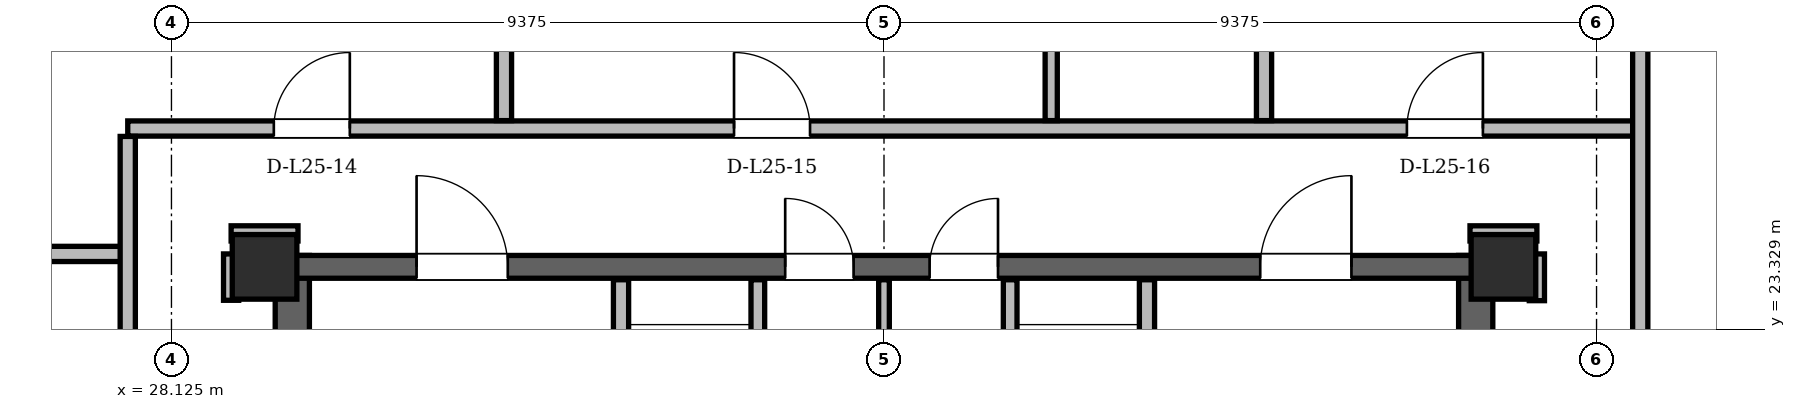
"""IFC4 building model, lengths in metres.
Left out: names, types, materials, properties, quantities, classifications, styles, units other than length and angle.
Written with IfcOpenShell. Run it as: python <this file> out.ifc"""

import sys

from ifc_helpers import new_model, si_unit, direction, frame, frame_2d, origin, origin_2d, place, context, subcontext, project, spatial, rectangle, hollow_rectangle, extrude, element, fill, save


model = new_model("IFC4")
c1 = context("Model", 3, precision=1e-05, world=origin(), true_north=direction((0.0, 1.0)))
c2 = subcontext(c1, "Body", "Model", "MODEL_VIEW")
j1 = project(units=[si_unit("LENGTHUNIT", "METRE"), si_unit("PLANEANGLEUNIT", "RADIAN")], contexts=[c1])
p1 = place(None, origin())
s1 = spatial("IfcSite", under=j1, at=p1, CompositionType="ELEMENT")
p2 = place(p1, origin())
s2 = spatial("IfcBuilding", under=s1, at=p2, CompositionType="ELEMENT")
p3 = place(p2, frame((0.0, 0.0, 96.9)))
s3 = spatial("IfcBuildingStorey", under=s2, at=p3, CompositionType="ELEMENT", Elevation=96.9)
for number, where, z_axis, x_axis in (
    (1, (45.65, 24.15, 0.0), (0.0, 0.0, 1.0), (1.0, 0.0, 0.0)),
    (2, (29.35, 24.15, 0.0), (0.0, 0.0, 1.0), (1.0, 0.0, 0.0)),
):
    element("IfcColumn", number, at=place(p3, frame(where, z_axis=z_axis, x_axis=x_axis)), inside=s3, PredefinedType="COLUMN", context=c2, shape_type="SweptSolid", body=[
        extrude(hollow_rectangle(XDim=0.85, YDim=0.85, WallThickness=0.07, at=origin_2d()), origin(), (0.0, 0.0, 1.0), 3.6),
    ])
for number, where, z_axis, x_axis in (
    (3, (29.715, 11.0, 0.0), (0.0, 0.0, 1.0), (0.0, 1.0, 0.0)),
    (4, (45.285, 11.0, 0.0), (0.0, 0.0, 1.0), (0.0, 1.0, 0.0)),
):
    element("IfcWall", number, at=place(p3, frame(where, z_axis=z_axis, x_axis=x_axis)), inside=s3, PredefinedType="SHEAR", context=c2, shape_type="SweptSolid", body=[
        extrude(rectangle(XDim=13.3, YDim=0.45, at=frame_2d((6.65, 0.0))), origin(), (0.0, 0.0, 1.0), 3.36),
    ])
p4 = place(p3, frame((29.65, 24.15, 0.0), z_axis=(0.0, 0.0, 1.0), x_axis=(1.0, 0.0, 0.0)))
e5 = element("IfcWall", 5, at=p4, inside=s3, PredefinedType="SHEAR", context=c2, shape_type="SweptSolid", body=[
    extrude(rectangle(XDim=15.7, YDim=0.3, at=frame_2d((7.85, 0.0))), origin(), (0.0, 0.0, 1.0), 3.36),
])
p5 = place(p4, frame((1.7, 0.0, 0.0)))
e6 = element("IfcOpeningElement", 6, at=p5, cuts=e5, PredefinedType="OPENING", context=c2, shape_type="SweptSolid", body=[
    extrude(rectangle(XDim=1.2, YDim=2.2, at=frame_2d((0.6, 1.1))), frame((0.0, 0.15, 0.0), z_axis=(0.0, -1.0, 0.0), x_axis=(1.0, 0.0, 0.0)), (0.0, 0.0, 1.0), 0.3),
])
p6 = place(p4, frame((12.8, 0.0, 0.0)))
e7 = element("IfcOpeningElement", 7, at=p6, cuts=e5, PredefinedType="OPENING", context=c2, shape_type="SweptSolid", body=[
    extrude(rectangle(XDim=1.2, YDim=2.2, at=frame_2d((0.6, 1.1))), frame((0.0, 0.15, 0.0), z_axis=(0.0, -1.0, 0.0), x_axis=(1.0, 0.0, 0.0)), (0.0, 0.0, 1.0), 0.3),
])
p7 = place(p4, frame((6.55, 0.0, 0.0)))
e8 = element("IfcOpeningElement", 8, at=p7, cuts=e5, PredefinedType="OPENING", context=c2, shape_type="SweptSolid", body=[
    extrude(rectangle(XDim=0.9, YDim=2.05, at=frame_2d((0.45, 1.025))), frame((0.0, 0.15, 0.0), z_axis=(0.0, -1.0, 0.0), x_axis=(1.0, 0.0, 0.0)), (0.0, 0.0, 1.0), 0.3),
])
p8 = place(p4, frame((8.45, 0.0, 0.0)))
e9 = element("IfcOpeningElement", 9, at=p8, cuts=e5, PredefinedType="OPENING", context=c2, shape_type="SweptSolid", body=[
    extrude(rectangle(XDim=0.9, YDim=2.05, at=frame_2d((0.45, 1.025))), frame((0.0, 0.15, 0.0), z_axis=(0.0, -1.0, 0.0), x_axis=(1.0, 0.0, 0.0)), (0.0, 0.0, 1.0), 0.3),
])
p9 = place(p3, frame((60.746, 13.639, 0.0), z_axis=(0.0, 0.0, 1.0), x_axis=(-0.499995749028, 0.86602785807, 0.0)))
e10 = element("IfcWall", 10, at=p9, inside=s3, PredefinedType="SOLIDWALL", context=c2, shape_type="SweptSolid", body=[
    extrude(rectangle(XDim=34.437, YDim=0.34, at=frame_2d((17.218, 0.0))), origin(), (0.0, 0.0, 1.0), 2.578),
])
p10 = place(p9, frame((3.01, 0.0, 0.0)))
e11 = element("IfcOpeningElement", 11, at=p10, cuts=e10, PredefinedType="OPENING", context=c2, shape_type="SweptSolid", body=[
    extrude(rectangle(XDim=1.5, YDim=2.2, at=frame_2d((0.75, 1.1))), frame((0.0, 0.17, 0.0), z_axis=(0.0, -1.0, 0.0), x_axis=(1.0, 0.0, 0.0)), (0.0, 0.0, 1.0), 0.34),
])
p11 = place(p9, frame((26.162, 0.0, 0.0)))
e12 = element("IfcOpeningElement", 12, at=p11, cuts=e10, PredefinedType="OPENING", context=c2, shape_type="SweptSolid", body=[
    extrude(rectangle(XDim=1.5, YDim=2.2, at=frame_2d((0.75, 1.1))), frame((0.0, 0.17, 0.0), z_axis=(0.0, -1.0, 0.0), x_axis=(1.0, 0.0, 0.0)), (0.0, 0.0, 1.0), 0.34),
])
p12 = place(p9, frame((0.966, 0.0, 0.85)))
e13 = element("IfcOpeningElement", 13, at=p12, cuts=e10, PredefinedType="OPENING", context=c2, shape_type="SweptSolid", body=[
    extrude(rectangle(XDim=1.2, YDim=1.48, at=frame_2d((0.6, 0.74))), frame((0.0, 0.17, 0.0), z_axis=(0.0, -1.0, 0.0), x_axis=(1.0, 0.0, 0.0)), (0.0, 0.0, 1.0), 0.34),
])
p13 = place(p9, frame((16.893, 0.0, 0.85)))
e14 = element("IfcOpeningElement", 14, at=p13, cuts=e10, PredefinedType="OPENING", context=c2, shape_type="SweptSolid", body=[
    extrude(rectangle(XDim=1.6, YDim=1.618, at=frame_2d((0.8, 0.809))), frame((0.0, 0.17, 0.0), z_axis=(0.0, -1.0, 0.0), x_axis=(1.0, 0.0, 0.0)), (0.0, 0.0, 1.0), 0.34),
])
p14 = place(p9, frame((21.524, 0.0, 0.85)))
e15 = element("IfcOpeningElement", 15, at=p14, cuts=e10, PredefinedType="OPENING", context=c2, shape_type="SweptSolid", body=[
    extrude(rectangle(XDim=1.2, YDim=1.48, at=frame_2d((0.6, 0.74))), frame((0.0, 0.17, 0.0), z_axis=(0.0, -1.0, 0.0), x_axis=(1.0, 0.0, 0.0)), (0.0, 0.0, 1.0), 0.34),
])
p15 = place(p9, frame((13.377, 0.0, 0.85)))
e16 = element("IfcOpeningElement", 16, at=p15, cuts=e10, PredefinedType="OPENING", context=c2, shape_type="SweptSolid", body=[
    extrude(rectangle(XDim=1.2, YDim=1.48, at=frame_2d((0.6, 0.74))), frame((0.0, 0.17, 0.0), z_axis=(0.0, -1.0, 0.0), x_axis=(1.0, 0.0, 0.0)), (0.0, 0.0, 1.0), 0.34),
])
p16 = place(p9, frame((30.824, 0.0, 0.85)))
e17 = element("IfcOpeningElement", 17, at=p16, cuts=e10, PredefinedType="OPENING", context=c2, shape_type="SweptSolid", body=[
    extrude(rectangle(XDim=2.6, YDim=1.618, at=frame_2d((1.3, 0.809))), frame((0.0, 0.17, 0.0), z_axis=(0.0, -1.0, 0.0), x_axis=(1.0, 0.0, 0.0)), (0.0, 0.0, 1.0), 0.34),
])
p17 = place(p3, frame((31.472, 43.462, 0.0), z_axis=(0.0, 0.0, 1.0), x_axis=(-0.499995749028, -0.86602785807, 0.0)))
e18 = element("IfcWall", 18, at=p17, inside=s3, PredefinedType="SOLIDWALL", context=c2, shape_type="SweptSolid", body=[
    extrude(rectangle(XDim=34.437, YDim=0.34, at=frame_2d((17.218, 0.0))), origin(), (0.0, 0.0, 1.0), 2.578),
])
p18 = place(p17, frame((6.469, 0.0, 0.0)))
e19 = element("IfcOpeningElement", 19, at=p18, cuts=e18, PredefinedType="OPENING", context=c2, shape_type="SweptSolid", body=[
    extrude(rectangle(XDim=1.3, YDim=2.2, at=frame_2d((0.65, 1.1))), frame((0.0, 0.17, 0.0), z_axis=(0.0, -1.0, 0.0), x_axis=(1.0, 0.0, 0.0)), (0.0, 0.0, 1.0), 0.34),
])
p19 = place(p17, frame((24.902, 0.0, 0.0)))
e20 = element("IfcOpeningElement", 20, at=p19, cuts=e18, PredefinedType="OPENING", context=c2, shape_type="SweptSolid", body=[
    extrude(rectangle(XDim=1.5, YDim=2.2, at=frame_2d((0.75, 1.1))), frame((0.0, 0.17, 0.0), z_axis=(0.0, -1.0, 0.0), x_axis=(1.0, 0.0, 0.0)), (0.0, 0.0, 1.0), 0.34),
])
p20 = place(p17, frame((30.75, 0.0, 0.85)))
e21 = element("IfcOpeningElement", 21, at=p20, cuts=e18, PredefinedType="OPENING", context=c2, shape_type="SweptSolid", body=[
    extrude(rectangle(XDim=1.4, YDim=1.6, at=frame_2d((0.7, 0.8))), frame((0.0, 0.17, 0.0), z_axis=(0.0, -1.0, 0.0), x_axis=(1.0, 0.0, 0.0)), (0.0, 0.0, 1.0), 0.34),
])
p21 = place(p17, frame((11.337, 0.0, 0.85)))
e22 = element("IfcOpeningElement", 22, at=p21, cuts=e18, PredefinedType="OPENING", context=c2, shape_type="SweptSolid", body=[
    extrude(rectangle(XDim=2.8, YDim=1.618, at=frame_2d((1.4, 0.809))), frame((0.0, 0.17, 0.0), z_axis=(0.0, -1.0, 0.0), x_axis=(1.0, 0.0, 0.0)), (0.0, 0.0, 1.0), 0.34),
])
p22 = place(p17, frame((18.111, 0.0, 0.85)))
e23 = element("IfcOpeningElement", 23, at=p22, cuts=e18, PredefinedType="OPENING", context=c2, shape_type="SweptSolid", body=[
    extrude(rectangle(XDim=2.2, YDim=1.618, at=frame_2d((1.1, 0.809))), frame((0.0, 0.17, 0.0), z_axis=(0.0, -1.0, 0.0), x_axis=(1.0, 0.0, 0.0)), (0.0, 0.0, 1.0), 0.34),
])
p23 = place(p17, frame((3.044, 0.0, 0.85)))
e24 = element("IfcOpeningElement", 24, at=p23, cuts=e18, PredefinedType="OPENING", context=c2, shape_type="SweptSolid", body=[
    extrude(rectangle(XDim=1.2, YDim=1.48, at=frame_2d((0.6, 0.74))), frame((0.0, 0.17, 0.0), z_axis=(0.0, -1.0, 0.0), x_axis=(1.0, 0.0, 0.0)), (0.0, 0.0, 1.0), 0.34),
])
p24 = place(p3, frame((34.04, 19.48, 0.0), z_axis=(0.0, 0.0, 1.0), x_axis=(0.0, 1.0, 0.0)))
e25 = element("IfcWall", 25, at=p24, inside=s3, PredefinedType="PARTITIONING", context=c2, shape_type="SweptSolid", body=[
    extrude(rectangle(XDim=4.5, YDim=0.2, at=frame_2d((2.25, 0.0))), origin(), (0.0, 0.0, 1.0), 2.4),
])
p25 = place(p24, frame((2.12, 0.0, 0.0)))
e26 = element("IfcOpeningElement", 26, at=p25, cuts=e25, PredefinedType="OPENING", context=c2, shape_type="SweptSolid", body=[
    extrude(rectangle(XDim=1.1, YDim=2.2, at=frame_2d((0.55, 1.1))), frame((0.0, 0.1, 0.0), z_axis=(0.0, -1.0, 0.0), x_axis=(1.0, 0.0, 0.0)), (0.0, 0.0, 1.0), 0.2),
])
p26 = place(p3, frame((35.84, 20.96, 0.0), z_axis=(0.0, 0.0, 1.0), x_axis=(0.0, 1.0, 0.0)))
e27 = element("IfcWall", 27, at=p26, inside=s3, PredefinedType="PARTITIONING", context=c2, shape_type="SweptSolid", body=[
    extrude(rectangle(XDim=3.02, YDim=0.18, at=frame_2d((1.51, 0.0))), origin(), (0.0, 0.0, 1.0), 2.4),
])
p27 = place(p3, frame((40.96, 19.48, 0.0), z_axis=(0.0, 0.0, 1.0), x_axis=(0.0, 1.0, 0.0)))
e28 = element("IfcWall", 28, at=p27, inside=s3, PredefinedType="PARTITIONING", context=c2, shape_type="SweptSolid", body=[
    extrude(rectangle(XDim=4.5, YDim=0.2, at=frame_2d((2.25, 0.0))), origin(), (0.0, 0.0, 1.0), 2.4),
])
p28 = place(p27, frame((2.12, 0.0, 0.0)))
e29 = element("IfcOpeningElement", 29, at=p28, cuts=e28, PredefinedType="OPENING", context=c2, shape_type="SweptSolid", body=[
    extrude(rectangle(XDim=1.1, YDim=2.2, at=frame_2d((0.55, 1.1))), frame((0.0, 0.1, 0.0), z_axis=(0.0, -1.0, 0.0), x_axis=(1.0, 0.0, 0.0)), (0.0, 0.0, 1.0), 0.2),
])
p29 = place(p3, frame((39.16, 20.96, 0.0), z_axis=(0.0, 0.0, 1.0), x_axis=(0.0, 1.0, 0.0)))
e30 = element("IfcWall", 30, at=p29, inside=s3, PredefinedType="PARTITIONING", context=c2, shape_type="SweptSolid", body=[
    extrude(rectangle(XDim=3.02, YDim=0.18, at=frame_2d((1.51, 0.0))), origin(), (0.0, 0.0, 1.0), 2.4),
])
p30 = place(p3, frame((37.5, 21.06, 0.0), z_axis=(0.0, 0.0, 1.0), x_axis=(0.0, 1.0, 0.0)))
e31 = element("IfcWall", 31, at=p30, inside=s3, PredefinedType="PARTITIONING", context=c2, shape_type="SweptSolid", body=[
    extrude(rectangle(XDim=2.92, YDim=0.14, at=frame_2d((1.46, 0.0))), origin(), (0.0, 0.0, 1.0), 2.4),
])
p31 = place(p3, frame((20.621, 24.32, 0.0), z_axis=(0.0, 0.0, 1.0), x_axis=(1.0, 0.0, 0.0)))
e32 = element("IfcWall", 32, at=p31, inside=s3, PredefinedType="PARTITIONING", context=c2, shape_type="SweptSolid", body=[
    extrude(rectangle(XDim=6.929, YDim=0.2, at=frame_2d((3.464, 0.0))), origin(), (0.0, 0.0, 1.0), 3.36),
])
for number, where, z_axis, x_axis in (
    (33, (28.91, 24.59, 0.0), (0.0, 0.0, 1.0), (1.0, 0.0, 0.0)),
    (34, (45.21, 24.59, 0.0), (0.0, 0.0, 1.0), (1.0, 0.0, 0.0)),
):
    element("IfcWall", number, at=place(p3, frame(where, z_axis=z_axis, x_axis=x_axis)), inside=s3, PredefinedType="PARTITIONING", context=c2, shape_type="SweptSolid", body=[
        extrude(rectangle(XDim=0.88, YDim=0.2, at=frame_2d((0.44, 0.0))), origin(), (0.0, 0.0, 1.0), 2.814),
    ])
p32 = place(p3, frame((27.55, 25.97, 0.0), z_axis=(0.0, 0.0, 1.0), x_axis=(1.0, 0.0, 0.0)))
e35 = element("IfcWall", 35, at=p32, inside=s3, PredefinedType="PARTITIONING", context=c2, shape_type="SweptSolid", body=[
    extrude(rectangle(XDim=19.9, YDim=0.2, at=frame_2d((9.95, 0.0))), origin(), (0.0, 0.0, 1.0), 2.814),
])
p33 = place(p32, frame((1.922, 0.0, 0.0)))
e36 = element("IfcOpeningElement", 36, at=p33, cuts=e35, PredefinedType="OPENING", context=c2, shape_type="SweptSolid", body=[
    extrude(rectangle(XDim=1.0, YDim=2.18, at=frame_2d((0.5, 1.09))), frame((0.0, 0.1, 0.0), z_axis=(0.0, -1.0, 0.0), x_axis=(1.0, 0.0, 0.0)), (0.0, 0.0, 1.0), 0.2),
])
p34 = place(p32, frame((7.977, 0.0, 0.0)))
e37 = element("IfcOpeningElement", 37, at=p34, cuts=e35, PredefinedType="OPENING", context=c2, shape_type="SweptSolid", body=[
    extrude(rectangle(XDim=1.0, YDim=2.18, at=frame_2d((0.5, 1.09))), frame((0.0, 0.1, 0.0), z_axis=(0.0, -1.0, 0.0), x_axis=(1.0, 0.0, 0.0)), (0.0, 0.0, 1.0), 0.2),
])
p35 = place(p32, frame((16.83, 0.0, 0.0)))
e38 = element("IfcOpeningElement", 38, at=p35, cuts=e35, PredefinedType="OPENING", context=c2, shape_type="SweptSolid", body=[
    extrude(rectangle(XDim=1.0, YDim=2.18, at=frame_2d((0.5, 1.09))), frame((0.0, 0.1, 0.0), z_axis=(0.0, -1.0, 0.0), x_axis=(1.0, 0.0, 0.0)), (0.0, 0.0, 1.0), 0.2),
])
p36 = place(p3, frame((27.55, 11.054, 0.0), z_axis=(0.0, 0.0, 1.0), x_axis=(0.0, 1.0, 0.0)))
e39 = element("IfcWall", 39, at=p36, inside=s3, PredefinedType="PARTITIONING", context=c2, shape_type="SweptSolid", body=[
    extrude(rectangle(XDim=14.812, YDim=0.2, at=frame_2d((7.406, 0.0))), origin(), (0.0, 0.0, 1.0), 2.814),
])
p37 = place(p36, frame((3.825, 0.0, 0.0)))
e40 = element("IfcOpeningElement", 40, at=p37, cuts=e39, PredefinedType="OPENING", context=c2, shape_type="SweptSolid", body=[
    extrude(rectangle(XDim=1.0, YDim=2.18, at=frame_2d((0.5, 1.09))), frame((0.0, 0.1, 0.0), z_axis=(0.0, -1.0, 0.0), x_axis=(1.0, 0.0, 0.0)), (0.0, 0.0, 1.0), 0.2),
])
p38 = place(p36, frame((7.788, 0.0, 0.0)))
e41 = element("IfcOpeningElement", 41, at=p38, cuts=e39, PredefinedType="OPENING", context=c2, shape_type="SweptSolid", body=[
    extrude(rectangle(XDim=1.0, YDim=2.18, at=frame_2d((0.5, 1.09))), frame((0.0, 0.1, 0.0), z_axis=(0.0, -1.0, 0.0), x_axis=(1.0, 0.0, 0.0)), (0.0, 0.0, 1.0), 0.2),
])
p39 = place(p3, frame((28.91, 23.71, 0.0), z_axis=(0.0, 0.0, 1.0), x_axis=(0.0, 1.0, 0.0)))
e42 = element("IfcWall", 42, at=p39, inside=s3, PredefinedType="PARTITIONING", context=c2, shape_type="SweptSolid", body=[
    extrude(rectangle(XDim=0.61, YDim=0.2, at=frame_2d((0.305, 0.0))), origin(), (0.0, 0.0, 1.0), 3.36),
])
p40 = place(p3, frame((32.5, 26.074, 0.0), z_axis=(0.0, 0.0, 1.0), x_axis=(0.0, 1.0, 0.0)))
e43 = element("IfcWall", 43, at=p40, inside=s3, PredefinedType="PARTITIONING", context=c2, shape_type="SweptSolid", body=[
    extrude(rectangle(XDim=17.214, YDim=0.2, at=frame_2d((8.607, 0.0))), origin(), (0.0, 0.0, 1.0), 3.36),
])
p41 = place(p3, frame((39.7, 26.074, 0.0), z_axis=(0.0, 0.0, 1.0), x_axis=(0.0, 1.0, 0.0)))
e44 = element("IfcWall", 44, at=p41, inside=s3, PredefinedType="PARTITIONING", context=c2, shape_type="SweptSolid", body=[
    extrude(rectangle(XDim=17.214, YDim=0.16, at=frame_2d((8.607, 0.0))), origin(), (0.0, 0.0, 1.0), 3.36),
])
p42 = place(p41, frame((1.253, 0.0, 0.0)))
e45 = element("IfcOpeningElement", 45, at=p42, cuts=e44, PredefinedType="OPENING", context=c2, shape_type="SweptSolid", body=[
    extrude(rectangle(XDim=0.92, YDim=2.12, at=frame_2d((0.46, 1.06))), frame((0.0, 0.08, 0.0), z_axis=(0.0, -1.0, 0.0), x_axis=(1.0, 0.0, 0.0)), (0.0, 0.0, 1.0), 0.16),
])
p43 = place(p41, frame((4.825, 0.0, 0.0)))
e46 = element("IfcOpeningElement", 46, at=p43, cuts=e44, PredefinedType="OPENING", context=c2, shape_type="SweptSolid", body=[
    extrude(rectangle(XDim=0.92, YDim=2.12, at=frame_2d((0.46, 1.06))), frame((0.0, 0.08, 0.0), z_axis=(0.0, -1.0, 0.0), x_axis=(1.0, 0.0, 0.0)), (0.0, 0.0, 1.0), 0.16),
])
p44 = place(p41, frame((7.889, 0.0, 0.0)))
e47 = element("IfcOpeningElement", 47, at=p44, cuts=e44, PredefinedType="OPENING", context=c2, shape_type="SweptSolid", body=[
    extrude(rectangle(XDim=0.95, YDim=2.1, at=frame_2d((0.475, 1.05))), frame((0.0, 0.08, 0.0), z_axis=(0.0, -1.0, 0.0), x_axis=(1.0, 0.0, 0.0)), (0.0, 0.0, 1.0), 0.16),
])
p45 = place(p41, frame((10.476, 0.0, 0.0)))
e48 = element("IfcOpeningElement", 48, at=p45, cuts=e44, PredefinedType="OPENING", context=c2, shape_type="SweptSolid", body=[
    extrude(rectangle(XDim=0.95, YDim=2.1, at=frame_2d((0.475, 1.05))), frame((0.0, 0.08, 0.0), z_axis=(0.0, -1.0, 0.0), x_axis=(1.0, 0.0, 0.0)), (0.0, 0.0, 1.0), 0.16),
])
p46 = place(p41, frame((13.233, 0.0, 0.0)))
e49 = element("IfcOpeningElement", 49, at=p46, cuts=e44, PredefinedType="OPENING", context=c2, shape_type="SweptSolid", body=[
    extrude(rectangle(XDim=0.95, YDim=2.1, at=frame_2d((0.475, 1.05))), frame((0.0, 0.08, 0.0), z_axis=(0.0, -1.0, 0.0), x_axis=(1.0, 0.0, 0.0)), (0.0, 0.0, 1.0), 0.16),
])
p47 = place(p41, frame((15.811, 0.0, 0.0)))
e50 = element("IfcOpeningElement", 50, at=p47, cuts=e44, PredefinedType="OPENING", context=c2, shape_type="SweptSolid", body=[
    extrude(rectangle(XDim=0.88, YDim=2.08, at=frame_2d((0.44, 1.04))), frame((0.0, 0.08, 0.0), z_axis=(0.0, -1.0, 0.0), x_axis=(1.0, 0.0, 0.0)), (0.0, 0.0, 1.0), 0.16),
])
p48 = place(p3, frame((42.5, 26.074, 0.0), z_axis=(0.0, 0.0, 1.0), x_axis=(0.0, 1.0, 0.0)))
e51 = element("IfcWall", 51, at=p48, inside=s3, PredefinedType="PARTITIONING", context=c2, shape_type="SweptSolid", body=[
    extrude(rectangle(XDim=17.214, YDim=0.2, at=frame_2d((8.607, 0.0))), origin(), (0.0, 0.0, 1.0), 3.36),
])
p49 = place(p3, frame((46.09, 23.705, 0.0), z_axis=(0.0, 0.0, 1.0), x_axis=(0.0, 1.0, 0.0)))
e52 = element("IfcWall", 52, at=p49, inside=s3, PredefinedType="PARTITIONING", context=c2, shape_type="SweptSolid", body=[
    extrude(rectangle(XDim=0.615, YDim=0.2, at=frame_2d((0.308, 0.0))), origin(), (0.0, 0.0, 1.0), 2.946),
])
p50 = place(p3, frame((47.45, 11.054, 0.0), z_axis=(0.0, 0.0, 1.0), x_axis=(0.0, 1.0, 0.0)))
e53 = element("IfcWall", 53, at=p50, inside=s3, PredefinedType="PARTITIONING", context=c2, shape_type="SweptSolid", body=[
    extrude(rectangle(XDim=25.267, YDim=0.2, at=frame_2d((12.633, 0.0))), origin(), (0.0, 0.0, 1.0), 2.578),
])
p51 = place(p50, frame((10.335, 0.0, 0.0)))
e54 = element("IfcOpeningElement", 54, at=p51, cuts=e53, PredefinedType="OPENING", context=c2, shape_type="SweptSolid", body=[
    extrude(rectangle(XDim=1.0, YDim=2.18, at=frame_2d((0.5, 1.09))), frame((0.0, 0.1, 0.0), z_axis=(0.0, -1.0, 0.0), x_axis=(1.0, 0.0, 0.0)), (0.0, 0.0, 1.0), 0.2),
])
p52 = place(p5, origin())
e55 = element("IfcDoor", 55, at=p52, inside=s3, OperationType="SINGLE_SWING_LEFT", PredefinedType="DOOR", context=c2, shape_type="SweptSolid", body=[
    extrude(rectangle(XDim=1.2, YDim=2.2, at=frame_2d((0.6, 1.1))), frame((0.0, 0.025, 0.0), z_axis=(0.0, -1.0, 0.0), x_axis=(1.0, 0.0, 0.0)), (0.0, 0.0, 1.0), 0.05),
])
fill(e6, e55)
p53 = place(p6, origin())
e56 = element("IfcDoor", 56, at=p53, inside=s3, OperationType="SINGLE_SWING_RIGHT", PredefinedType="DOOR", context=c2, shape_type="SweptSolid", body=[
    extrude(rectangle(XDim=1.2, YDim=2.2, at=frame_2d((0.6, 1.1))), frame((0.0, 0.025, 0.0), z_axis=(0.0, -1.0, 0.0), x_axis=(1.0, 0.0, 0.0)), (0.0, 0.0, 1.0), 0.05),
])
fill(e7, e56)
p54 = place(p7, origin())
e57 = element("IfcDoor", 57, at=p54, inside=s3, OperationType="SINGLE_SWING_LEFT", PredefinedType="DOOR", context=c2, shape_type="SweptSolid", body=[
    extrude(rectangle(XDim=0.9, YDim=2.05, at=frame_2d((0.45, 1.025))), frame((0.0, 0.025, 0.0), z_axis=(0.0, -1.0, 0.0), x_axis=(1.0, 0.0, 0.0)), (0.0, 0.0, 1.0), 0.05),
])
fill(e8, e57)
p55 = place(p8, origin())
e58 = element("IfcDoor", 58, at=p55, inside=s3, OperationType="SINGLE_SWING_RIGHT", PredefinedType="DOOR", context=c2, shape_type="SweptSolid", body=[
    extrude(rectangle(XDim=0.9, YDim=2.05, at=frame_2d((0.45, 1.025))), frame((0.0, 0.025, 0.0), z_axis=(0.0, -1.0, 0.0), x_axis=(1.0, 0.0, 0.0)), (0.0, 0.0, 1.0), 0.05),
])
fill(e9, e58)
p56 = place(p33, origin())
e59 = element("IfcDoor", 59, at=p56, inside=s3, OperationType="SINGLE_SWING_RIGHT", PredefinedType="DOOR", context=c2, shape_type="SweptSolid", body=[
    extrude(rectangle(XDim=1.0, YDim=2.18, at=frame_2d((0.5, 1.09))), frame((0.0, 0.025, 0.0), z_axis=(0.0, -1.0, 0.0), x_axis=(1.0, 0.0, 0.0)), (0.0, 0.0, 1.0), 0.05),
])
fill(e36, e59)
p57 = place(p34, origin())
e60 = element("IfcDoor", 60, at=p57, inside=s3, OperationType="SINGLE_SWING_LEFT", PredefinedType="DOOR", context=c2, shape_type="SweptSolid", body=[
    extrude(rectangle(XDim=1.0, YDim=2.18, at=frame_2d((0.5, 1.09))), frame((0.0, 0.025, 0.0), z_axis=(0.0, -1.0, 0.0), x_axis=(1.0, 0.0, 0.0)), (0.0, 0.0, 1.0), 0.05),
])
fill(e37, e60)
p58 = place(p35, origin())
e61 = element("IfcDoor", 61, at=p58, inside=s3, OperationType="SINGLE_SWING_RIGHT", PredefinedType="DOOR", context=c2, shape_type="SweptSolid", body=[
    extrude(rectangle(XDim=1.0, YDim=2.18, at=frame_2d((0.5, 1.09))), frame((0.0, 0.025, 0.0), z_axis=(0.0, -1.0, 0.0), x_axis=(1.0, 0.0, 0.0)), (0.0, 0.0, 1.0), 0.05),
])
fill(e38, e61)
save(model, sys.argv[1])
